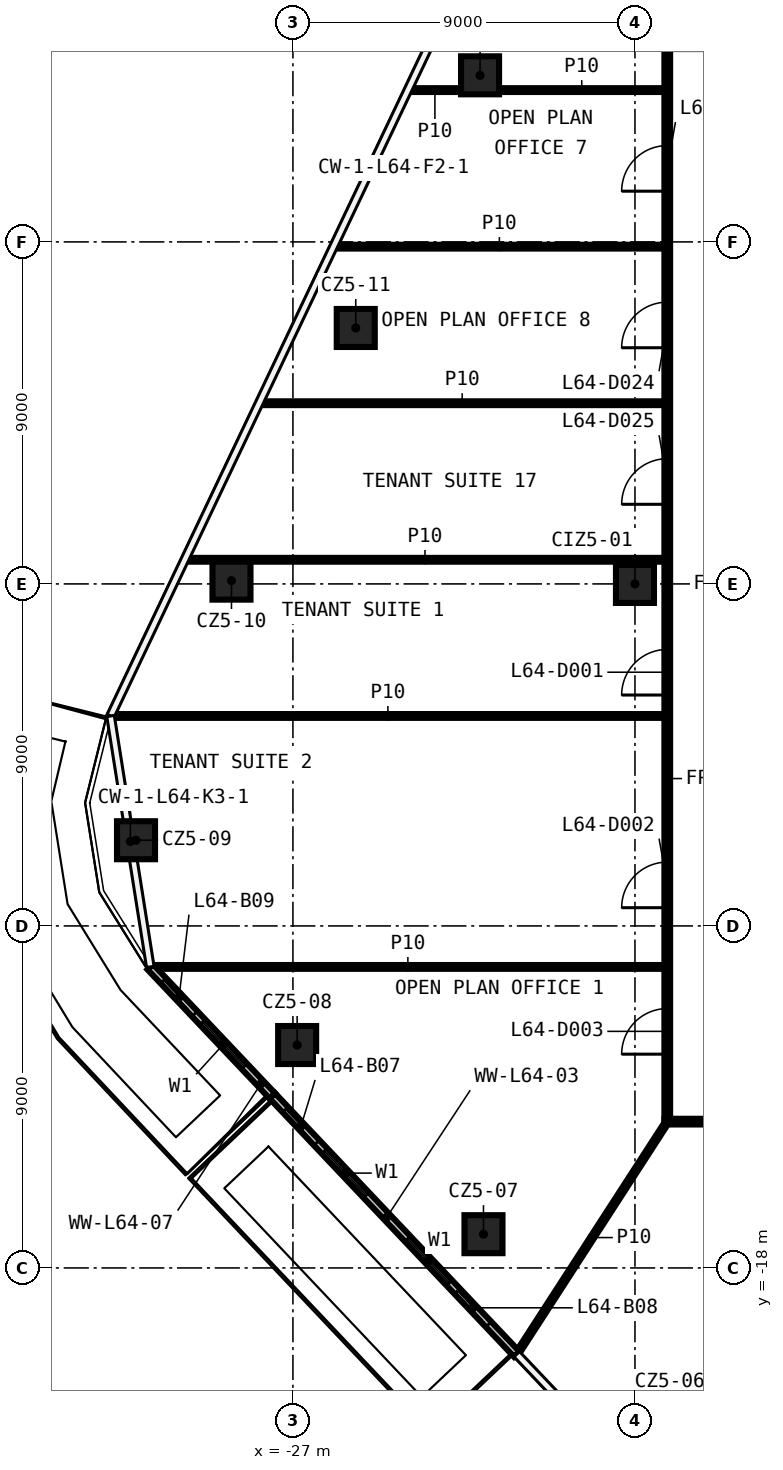
"""IFC4 building model, lengths in metres.
Left out: names, types, materials, properties, quantities, classifications, styles, units other than length and angle.
Written with IfcOpenShell. Run it as: python <this file> out.ifc"""

import sys

from ifc_helpers import new_model, si_unit, direction, frame, frame_2d, origin, origin_2d, place, context, subcontext, project, spatial, rectangle, extrude, element, fill, save


model = new_model("IFC4")
c1 = context("Model", 3, precision=1e-05, world=origin(), true_north=direction((0.0, 1.0)))
c2 = subcontext(c1, "Body", "Model", "MODEL_VIEW")
j1 = project(units=[si_unit("LENGTHUNIT", "METRE"), si_unit("PLANEANGLEUNIT", "RADIAN")], contexts=[c1])
p1 = place(None, origin())
s1 = spatial("IfcSite", under=j1, at=p1, CompositionType="ELEMENT")
p2 = place(p1, origin())
s2 = spatial("IfcBuilding", under=s1, at=p2, CompositionType="ELEMENT")
p3 = place(p2, frame((0.0, 0.0, 302.6)))
s3 = spatial("IfcBuildingStorey", under=s2, at=p3, CompositionType="ELEMENT", Elevation=302.6)
for number, where, z_axis, x_axis in (
    (1, (-21.986, -17.112, 0.0), (0.0, 0.0, 1.0), (1.0, 0.0, 0.0)),
    (2, (-26.889, -12.134, 0.0), (0.0, 0.0, 1.0), (1.0, 0.0, 0.0)),
    (3, (-31.129, -6.745, 0.0), (0.0, 0.0, 1.0), (1.0, 0.0, 0.0)),
    (4, (-28.617, 0.086, 0.0), (0.0, 0.0, 1.0), (1.0, 0.0, 0.0)),
    (5, (-25.347, 6.735, 0.0), (0.0, 0.0, 1.0), (1.0, 0.0, 0.0)),
    (6, (-22.076, 13.384, 0.0), (0.0, 0.0, 1.0), (1.0, 0.0, 0.0)),
    (7, (-18.0, 0.0, 0.0), (0.0, 0.0, 1.0), (1.0, 0.0, 0.0)),
):
    element("IfcColumn", number, at=place(p3, frame(where, z_axis=z_axis, x_axis=x_axis)), inside=s3, PredefinedType="COLUMN", context=c2, shape_type="SweptSolid", body=[
        extrude(rectangle(XDim=1.0, YDim=1.0, at=origin_2d()), origin(), (0.0, 0.0, 1.0), 3.82),
    ])
p4 = place(p3, frame((17.225, -14.15, 0.0), z_axis=(0.0, 0.0, 1.0), x_axis=(-1.0, 0.0, 0.0)))
e8 = element("IfcWall", 8, at=p4, inside=s3, PredefinedType="PARTITIONING", context=c2, shape_type="SweptSolid", body=[
    extrude(rectangle(XDim=34.45, YDim=0.15, at=frame_2d((17.225, 0.0))), origin(), (0.0, 0.0, 1.0), 3.82),
])
p5 = place(p4, frame((31.54, 0.0, 0.0)))
e9 = element("IfcOpeningElement", 9, at=p5, cuts=e8, PredefinedType="OPENING", context=c2, shape_type="SweptSolid", body=[
    extrude(rectangle(XDim=1.2, YDim=2.1, at=frame_2d((0.6, 1.05))), frame((0.0, 0.085, 0.0), z_axis=(0.0, -1.0, 0.0), x_axis=(1.0, 0.0, 0.0)), (0.0, 0.0, 1.0), 0.17),
])
p6 = place(p4, frame((25.804, 0.0, 0.0)))
e10 = element("IfcOpeningElement", 10, at=p6, cuts=e8, PredefinedType="OPENING", context=c2, shape_type="SweptSolid", body=[
    extrude(rectangle(XDim=1.2, YDim=2.1, at=frame_2d((0.6, 1.05))), frame((0.0, 0.085, 0.0), z_axis=(0.0, -1.0, 0.0), x_axis=(1.0, 0.0, 0.0)), (0.0, 0.0, 1.0), 0.17),
])
p7 = place(p4, frame((17.681, 0.0, 0.0)))
e11 = element("IfcOpeningElement", 11, at=p7, cuts=e8, PredefinedType="OPENING", context=c2, shape_type="SweptSolid", body=[
    extrude(rectangle(XDim=1.2, YDim=2.1, at=frame_2d((0.6, 1.05))), frame((0.0, 0.085, 0.0), z_axis=(0.0, -1.0, 0.0), x_axis=(1.0, 0.0, 0.0)), (0.0, 0.0, 1.0), 0.17),
])
p8 = place(p4, frame((10.752, 0.0, 0.0)))
e12 = element("IfcOpeningElement", 12, at=p8, cuts=e8, PredefinedType="OPENING", context=c2, shape_type="SweptSolid", body=[
    extrude(rectangle(XDim=1.2, YDim=2.1, at=frame_2d((0.6, 1.05))), frame((0.0, 0.085, 0.0), z_axis=(0.0, -1.0, 0.0), x_axis=(1.0, 0.0, 0.0)), (0.0, 0.0, 1.0), 0.17),
])
p9 = place(p4, frame((6.133, 0.0, 0.0)))
e13 = element("IfcOpeningElement", 13, at=p9, cuts=e8, PredefinedType="OPENING", context=c2, shape_type="SweptSolid", body=[
    extrude(rectangle(XDim=1.2, YDim=2.1, at=frame_2d((0.6, 1.05))), frame((0.0, 0.085, 0.0), z_axis=(0.0, -1.0, 0.0), x_axis=(1.0, 0.0, 0.0)), (0.0, 0.0, 1.0), 0.17),
])
p10 = place(p4, frame((1.851, 0.0, 0.0)))
e14 = element("IfcOpeningElement", 14, at=p10, cuts=e8, PredefinedType="OPENING", context=c2, shape_type="SweptSolid", body=[
    extrude(rectangle(XDim=1.2, YDim=2.1, at=frame_2d((0.6, 1.05))), frame((0.0, 0.085, 0.0), z_axis=(0.0, -1.0, 0.0), x_axis=(1.0, 0.0, 0.0)), (0.0, 0.0, 1.0), 0.17),
])
p11 = place(p3, frame((-30.726, -10.079, 0.0), z_axis=(0.0, 0.0, 1.0), x_axis=(1.0, 0.0, 0.0)))
e15 = element("IfcWall", 15, at=p11, inside=s3, PredefinedType="PARTITIONING", context=c2, shape_type="SweptSolid", body=[
    extrude(rectangle(XDim=13.5, YDim=0.1, at=frame_2d((6.75, 0.0))), origin(), (0.0, 0.0, 1.0), 3.82),
])
p12 = place(p3, frame((-31.777, -3.475, 0.0), z_axis=(0.0, 0.0, 1.0), x_axis=(1.0, 0.0, 0.0)))
e16 = element("IfcWall", 16, at=p12, inside=s3, PredefinedType="PARTITIONING", context=c2, shape_type="SweptSolid", body=[
    extrude(rectangle(XDim=14.552, YDim=0.1, at=frame_2d((7.276, 0.0))), origin(), (0.0, 0.0, 1.0), 3.82),
])
p13 = place(p3, frame((-29.824, 0.635, 0.0), z_axis=(0.0, 0.0, 1.0), x_axis=(1.0, 0.0, 0.0)))
e17 = element("IfcWall", 17, at=p13, inside=s3, PredefinedType="PARTITIONING", context=c2, shape_type="SweptSolid", body=[
    extrude(rectangle(XDim=12.599, YDim=0.1, at=frame_2d((6.3, 0.0))), origin(), (0.0, 0.0, 1.0), 3.82),
])
p14 = place(p3, frame((-27.867, 4.755, 0.0), z_axis=(0.0, 0.0, 1.0), x_axis=(1.0, 0.0, 0.0)))
e18 = element("IfcWall", 18, at=p14, inside=s3, PredefinedType="PARTITIONING", context=c2, shape_type="SweptSolid", body=[
    extrude(rectangle(XDim=10.642, YDim=0.1, at=frame_2d((5.321, 0.0))), origin(), (0.0, 0.0, 1.0), 3.82),
])
p15 = place(p3, frame((-25.909, 8.875, 0.0), z_axis=(0.0, 0.0, 1.0), x_axis=(1.0, 0.0, 0.0)))
e19 = element("IfcWall", 19, at=p15, inside=s3, PredefinedType="PARTITIONING", context=c2, shape_type="SweptSolid", body=[
    extrude(rectangle(XDim=8.684, YDim=0.1, at=frame_2d((4.342, 0.0))), origin(), (0.0, 0.0, 1.0), 3.82),
])
p16 = place(p3, frame((-23.952, 12.995, 0.0), z_axis=(0.0, 0.0, 1.0), x_axis=(1.0, 0.0, 0.0)))
e20 = element("IfcWall", 20, at=p16, inside=s3, PredefinedType="PARTITIONING", context=c2, shape_type="SweptSolid", body=[
    extrude(rectangle(XDim=1.376, YDim=0.1, at=frame_2d((0.688, 0.0))), origin(), (0.0, 0.0, 1.0), 3.82),
])
p17 = place(p3, frame((-21.576, 12.995, 0.0), z_axis=(0.0, 0.0, 1.0), x_axis=(1.0, 0.0, 0.0)))
e21 = element("IfcWall", 21, at=p17, inside=s3, PredefinedType="PARTITIONING", context=c2, shape_type="SweptSolid", body=[
    extrude(rectangle(XDim=4.351, YDim=0.1, at=frame_2d((2.175, 0.0))), origin(), (0.0, 0.0, 1.0), 3.82),
])
p18 = place(p3, frame((-21.099, -20.252, 0.0), z_axis=(0.0, 0.0, 1.0), x_axis=(0.543308378863, 0.839533206882, 0.0)))
e22 = element("IfcWall", 22, at=p18, inside=s3, PredefinedType="PARTITIONING", context=c2, shape_type="SweptSolid", body=[
    extrude(rectangle(XDim=7.268, YDim=0.1, at=frame_2d((3.634, 0.0))), origin(), (0.0, 0.0, 1.0), 3.82),
])
p19 = place(p3, frame((-17.15, -14.075, 0.0), z_axis=(0.0, 0.0, 1.0), x_axis=(0.0, 1.0, 0.0)))
e23 = element("IfcWall", 23, at=p19, inside=s3, PredefinedType="PARTITIONING", context=c2, shape_type="SweptSolid", body=[
    extrude(rectangle(XDim=28.15, YDim=0.15, at=frame_2d((14.075, 0.0))), origin(), (0.0, 0.0, 1.0), 3.82),
])
p20 = place(p19, frame((11.151, 0.0, 0.0)))
e24 = element("IfcOpeningElement", 24, at=p20, cuts=e23, PredefinedType="OPENING", context=c2, shape_type="SweptSolid", body=[
    extrude(rectangle(XDim=1.2, YDim=2.1, at=frame_2d((0.6, 1.05))), frame((0.0, 0.085, 0.0), z_axis=(0.0, -1.0, 0.0), x_axis=(1.0, 0.0, 0.0)), (0.0, 0.0, 1.0), 0.17),
])
p21 = place(p19, frame((5.555, 0.0, 0.0)))
e25 = element("IfcOpeningElement", 25, at=p21, cuts=e23, PredefinedType="OPENING", context=c2, shape_type="SweptSolid", body=[
    extrude(rectangle(XDim=1.2, YDim=2.1, at=frame_2d((0.6, 1.05))), frame((0.0, 0.085, 0.0), z_axis=(0.0, -1.0, 0.0), x_axis=(1.0, 0.0, 0.0)), (0.0, 0.0, 1.0), 0.17),
])
p22 = place(p19, frame((1.7, 0.0, 0.0)))
e26 = element("IfcOpeningElement", 26, at=p22, cuts=e23, PredefinedType="OPENING", context=c2, shape_type="SweptSolid", body=[
    extrude(rectangle(XDim=1.2, YDim=2.1, at=frame_2d((0.6, 1.05))), frame((0.0, 0.085, 0.0), z_axis=(0.0, -1.0, 0.0), x_axis=(1.0, 0.0, 0.0)), (0.0, 0.0, 1.0), 0.17),
])
p23 = place(p19, frame((24.41, 0.0, 0.0)))
e27 = element("IfcOpeningElement", 27, at=p23, cuts=e23, PredefinedType="OPENING", context=c2, shape_type="SweptSolid", body=[
    extrude(rectangle(XDim=1.2, YDim=2.1, at=frame_2d((0.6, 1.05))), frame((0.0, 0.085, 0.0), z_axis=(0.0, -1.0, 0.0), x_axis=(1.0, 0.0, 0.0)), (0.0, 0.0, 1.0), 0.17),
])
p24 = place(p19, frame((20.29, 0.0, 0.0)))
e28 = element("IfcOpeningElement", 28, at=p24, cuts=e23, PredefinedType="OPENING", context=c2, shape_type="SweptSolid", body=[
    extrude(rectangle(XDim=1.2, YDim=2.1, at=frame_2d((0.6, 1.05))), frame((0.0, 0.085, 0.0), z_axis=(0.0, -1.0, 0.0), x_axis=(1.0, 0.0, 0.0)), (0.0, 0.0, 1.0), 0.17),
])
p25 = place(p19, frame((16.17, 0.0, 0.0)))
e29 = element("IfcOpeningElement", 29, at=p25, cuts=e23, PredefinedType="OPENING", context=c2, shape_type="SweptSolid", body=[
    extrude(rectangle(XDim=1.2, YDim=2.1, at=frame_2d((0.6, 1.05))), frame((0.0, 0.085, 0.0), z_axis=(0.0, -1.0, 0.0), x_axis=(1.0, 0.0, 0.0)), (0.0, 0.0, 1.0), 0.17),
])
p26 = place(p3, frame((-27.543, -13.471, 0.0), z_axis=(0.0, 0.0, 1.0), x_axis=(0.687314061727, -0.726360365488, 0.0)))
e30 = element("IfcWall", 30, at=p26, inside=s3, PredefinedType="SOLIDWALL", context=c2, shape_type="SweptSolid", body=[
    extrude(rectangle(XDim=9.36, YDim=0.2, at=frame_2d((4.68, 0.0))), origin(), (0.0, 0.0, 1.0), 3.82),
])
p27 = place(p26, frame((2.0, 0.0, 0.6)))
e31 = element("IfcOpeningElement", 31, at=p27, cuts=e30, PredefinedType="OPENING", context=c2, shape_type="SweptSolid", body=[
    extrude(rectangle(XDim=1.6, YDim=2.4, at=frame_2d((0.8, 1.2))), frame((0.0, 0.11, 0.0), z_axis=(0.0, -1.0, 0.0), x_axis=(1.0, 0.0, 0.0)), (0.0, 0.0, 1.0), 0.22),
])
p28 = place(p26, frame((0.5, 0.0, 0.0)))
e32 = element("IfcOpeningElement", 32, at=p28, cuts=e30, PredefinedType="OPENING", context=c2, shape_type="SweptSolid", body=[
    extrude(rectangle(XDim=1.2, YDim=2.4, at=frame_2d((0.6, 1.2))), frame((0.0, 0.11, 0.0), z_axis=(0.0, -1.0, 0.0), x_axis=(1.0, 0.0, 0.0)), (0.0, 0.0, 1.0), 0.22),
])
p29 = place(p26, frame((5.18, 0.0, 0.6)))
e33 = element("IfcOpeningElement", 33, at=p29, cuts=e30, PredefinedType="OPENING", context=c2, shape_type="SweptSolid", body=[
    extrude(rectangle(XDim=1.6, YDim=2.4, at=frame_2d((0.8, 1.2))), frame((0.0, 0.11, 0.0), z_axis=(0.0, -1.0, 0.0), x_axis=(1.0, 0.0, 0.0)), (0.0, 0.0, 1.0), 0.22),
])
p30 = place(p26, frame((7.08, 0.0, 0.0)))
e34 = element("IfcOpeningElement", 34, at=p30, cuts=e30, PredefinedType="OPENING", context=c2, shape_type="SweptSolid", body=[
    extrude(rectangle(XDim=1.2, YDim=2.4, at=frame_2d((0.6, 1.2))), frame((0.0, 0.11, 0.0), z_axis=(0.0, -1.0, 0.0), x_axis=(1.0, 0.0, 0.0)), (0.0, 0.0, 1.0), 0.22),
])
p31 = place(p3, frame((-30.753, -10.079, 0.0), z_axis=(0.0, 0.0, 1.0), x_axis=(0.687310953658, -0.726363306467, 0.0)))
e35 = element("IfcWall", 35, at=p31, inside=s3, PredefinedType="SOLIDWALL", context=c2, shape_type="SweptSolid", body=[
    extrude(rectangle(XDim=4.67, YDim=0.2, at=frame_2d((2.335, 0.0))), origin(), (0.0, 0.0, 1.0), 3.82),
])
p32 = place(p31, frame((2.0, 0.0, 0.6)))
e36 = element("IfcOpeningElement", 36, at=p32, cuts=e35, PredefinedType="OPENING", context=c2, shape_type="SweptSolid", body=[
    extrude(rectangle(XDim=1.6, YDim=2.4, at=frame_2d((0.8, 1.2))), frame((0.0, 0.11, 0.0), z_axis=(0.0, -1.0, 0.0), x_axis=(1.0, 0.0, 0.0)), (0.0, 0.0, 1.0), 0.22),
])
p33 = place(p31, frame((0.5, 0.0, 0.0)))
e37 = element("IfcOpeningElement", 37, at=p33, cuts=e35, PredefinedType="OPENING", context=c2, shape_type="SweptSolid", body=[
    extrude(rectangle(XDim=1.2, YDim=2.4, at=frame_2d((0.6, 1.2))), frame((0.0, 0.11, 0.0), z_axis=(0.0, -1.0, 0.0), x_axis=(1.0, 0.0, 0.0)), (0.0, 0.0, 1.0), 0.22),
])
p34 = place(p20, origin())
e38 = element("IfcDoor", 38, at=p34, inside=s3, OperationType="SINGLE_SWING_RIGHT", PredefinedType="DOOR", context=c2, shape_type="SweptSolid", body=[
    extrude(rectangle(XDim=1.2, YDim=2.1, at=frame_2d((0.6, 1.05))), frame((0.0, 0.025, 0.0), z_axis=(0.0, -1.0, 0.0), x_axis=(1.0, 0.0, 0.0)), (0.0, 0.0, 1.0), 0.05),
])
fill(e24, e38)
p35 = place(p21, origin())
e39 = element("IfcDoor", 39, at=p35, inside=s3, OperationType="SINGLE_SWING_LEFT", PredefinedType="DOOR", context=c2, shape_type="SweptSolid", body=[
    extrude(rectangle(XDim=1.2, YDim=2.1, at=frame_2d((0.6, 1.05))), frame((0.0, 0.025, 0.0), z_axis=(0.0, -1.0, 0.0), x_axis=(1.0, 0.0, 0.0)), (0.0, 0.0, 1.0), 0.05),
])
fill(e25, e39)
p36 = place(p22, origin())
e40 = element("IfcDoor", 40, at=p36, inside=s3, OperationType="SINGLE_SWING_RIGHT", PredefinedType="DOOR", context=c2, shape_type="SweptSolid", body=[
    extrude(rectangle(XDim=1.2, YDim=2.1, at=frame_2d((0.6, 1.05))), frame((0.0, 0.025, 0.0), z_axis=(0.0, -1.0, 0.0), x_axis=(1.0, 0.0, 0.0)), (0.0, 0.0, 1.0), 0.05),
])
fill(e26, e40)
p37 = place(p23, origin())
e41 = element("IfcDoor", 41, at=p37, inside=s3, OperationType="SINGLE_SWING_RIGHT", PredefinedType="DOOR", context=c2, shape_type="SweptSolid", body=[
    extrude(rectangle(XDim=1.2, YDim=2.1, at=frame_2d((0.6, 1.05))), frame((0.0, 0.025, 0.0), z_axis=(0.0, -1.0, 0.0), x_axis=(1.0, 0.0, 0.0)), (0.0, 0.0, 1.0), 0.05),
])
fill(e27, e41)
p38 = place(p24, origin())
e42 = element("IfcDoor", 42, at=p38, inside=s3, OperationType="SINGLE_SWING_LEFT", PredefinedType="DOOR", context=c2, shape_type="SweptSolid", body=[
    extrude(rectangle(XDim=1.2, YDim=2.1, at=frame_2d((0.6, 1.05))), frame((0.0, 0.025, 0.0), z_axis=(0.0, -1.0, 0.0), x_axis=(1.0, 0.0, 0.0)), (0.0, 0.0, 1.0), 0.05),
])
fill(e28, e42)
p39 = place(p25, origin())
e43 = element("IfcDoor", 43, at=p39, inside=s3, OperationType="SINGLE_SWING_RIGHT", PredefinedType="DOOR", context=c2, shape_type="SweptSolid", body=[
    extrude(rectangle(XDim=1.2, YDim=2.1, at=frame_2d((0.6, 1.05))), frame((0.0, 0.025, 0.0), z_axis=(0.0, -1.0, 0.0), x_axis=(1.0, 0.0, 0.0)), (0.0, 0.0, 1.0), 0.05),
])
fill(e29, e43)
p40 = place(p27, origin())
e44 = element("IfcWindow", 44, at=p40, inside=s3, PartitioningType="SINGLE_PANEL", PredefinedType="WINDOW", context=c2, shape_type="SweptSolid", body=[
    extrude(rectangle(XDim=1.6, YDim=2.4, at=frame_2d((0.8, 1.2))), frame((0.0, 0.03, 0.0), z_axis=(0.0, -1.0, 0.0), x_axis=(1.0, 0.0, 0.0)), (0.0, 0.0, 1.0), 0.06),
])
fill(e31, e44)
p41 = place(p28, origin())
e45 = element("IfcDoor", 45, at=p41, inside=s3, OperationType="SLIDING_TO_LEFT", PredefinedType="DOOR", context=c2, shape_type="SweptSolid", body=[
    extrude(rectangle(XDim=1.2, YDim=2.4, at=frame_2d((0.6, 1.2))), frame((0.0, 0.025, 0.0), z_axis=(0.0, -1.0, 0.0), x_axis=(1.0, 0.0, 0.0)), (0.0, 0.0, 1.0), 0.05),
])
fill(e32, e45)
p42 = place(p29, origin())
e46 = element("IfcWindow", 46, at=p42, inside=s3, PartitioningType="SINGLE_PANEL", PredefinedType="WINDOW", context=c2, shape_type="SweptSolid", body=[
    extrude(rectangle(XDim=1.6, YDim=2.4, at=frame_2d((0.8, 1.2))), frame((0.0, 0.03, 0.0), z_axis=(0.0, -1.0, 0.0), x_axis=(1.0, 0.0, 0.0)), (0.0, 0.0, 1.0), 0.06),
])
fill(e33, e46)
p43 = place(p30, origin())
e47 = element("IfcDoor", 47, at=p43, inside=s3, OperationType="SLIDING_TO_LEFT", PredefinedType="DOOR", context=c2, shape_type="SweptSolid", body=[
    extrude(rectangle(XDim=1.2, YDim=2.4, at=frame_2d((0.6, 1.2))), frame((0.0, 0.025, 0.0), z_axis=(0.0, -1.0, 0.0), x_axis=(1.0, 0.0, 0.0)), (0.0, 0.0, 1.0), 0.05),
])
fill(e34, e47)
p44 = place(p32, origin())
e48 = element("IfcWindow", 48, at=p44, inside=s3, PartitioningType="SINGLE_PANEL", PredefinedType="WINDOW", context=c2, shape_type="SweptSolid", body=[
    extrude(rectangle(XDim=1.6, YDim=2.4, at=frame_2d((0.8, 1.2))), frame((0.0, 0.03, 0.0), z_axis=(0.0, -1.0, 0.0), x_axis=(1.0, 0.0, 0.0)), (0.0, 0.0, 1.0), 0.06),
])
fill(e36, e48)
p45 = place(p33, origin())
e49 = element("IfcDoor", 49, at=p45, inside=s3, OperationType="SLIDING_TO_LEFT", PredefinedType="DOOR", context=c2, shape_type="SweptSolid", body=[
    extrude(rectangle(XDim=1.2, YDim=2.4, at=frame_2d((0.6, 1.2))), frame((0.0, 0.025, 0.0), z_axis=(0.0, -1.0, 0.0), x_axis=(1.0, 0.0, 0.0)), (0.0, 0.0, 1.0), 0.05),
])
fill(e37, e49)
save(model, sys.argv[1])
